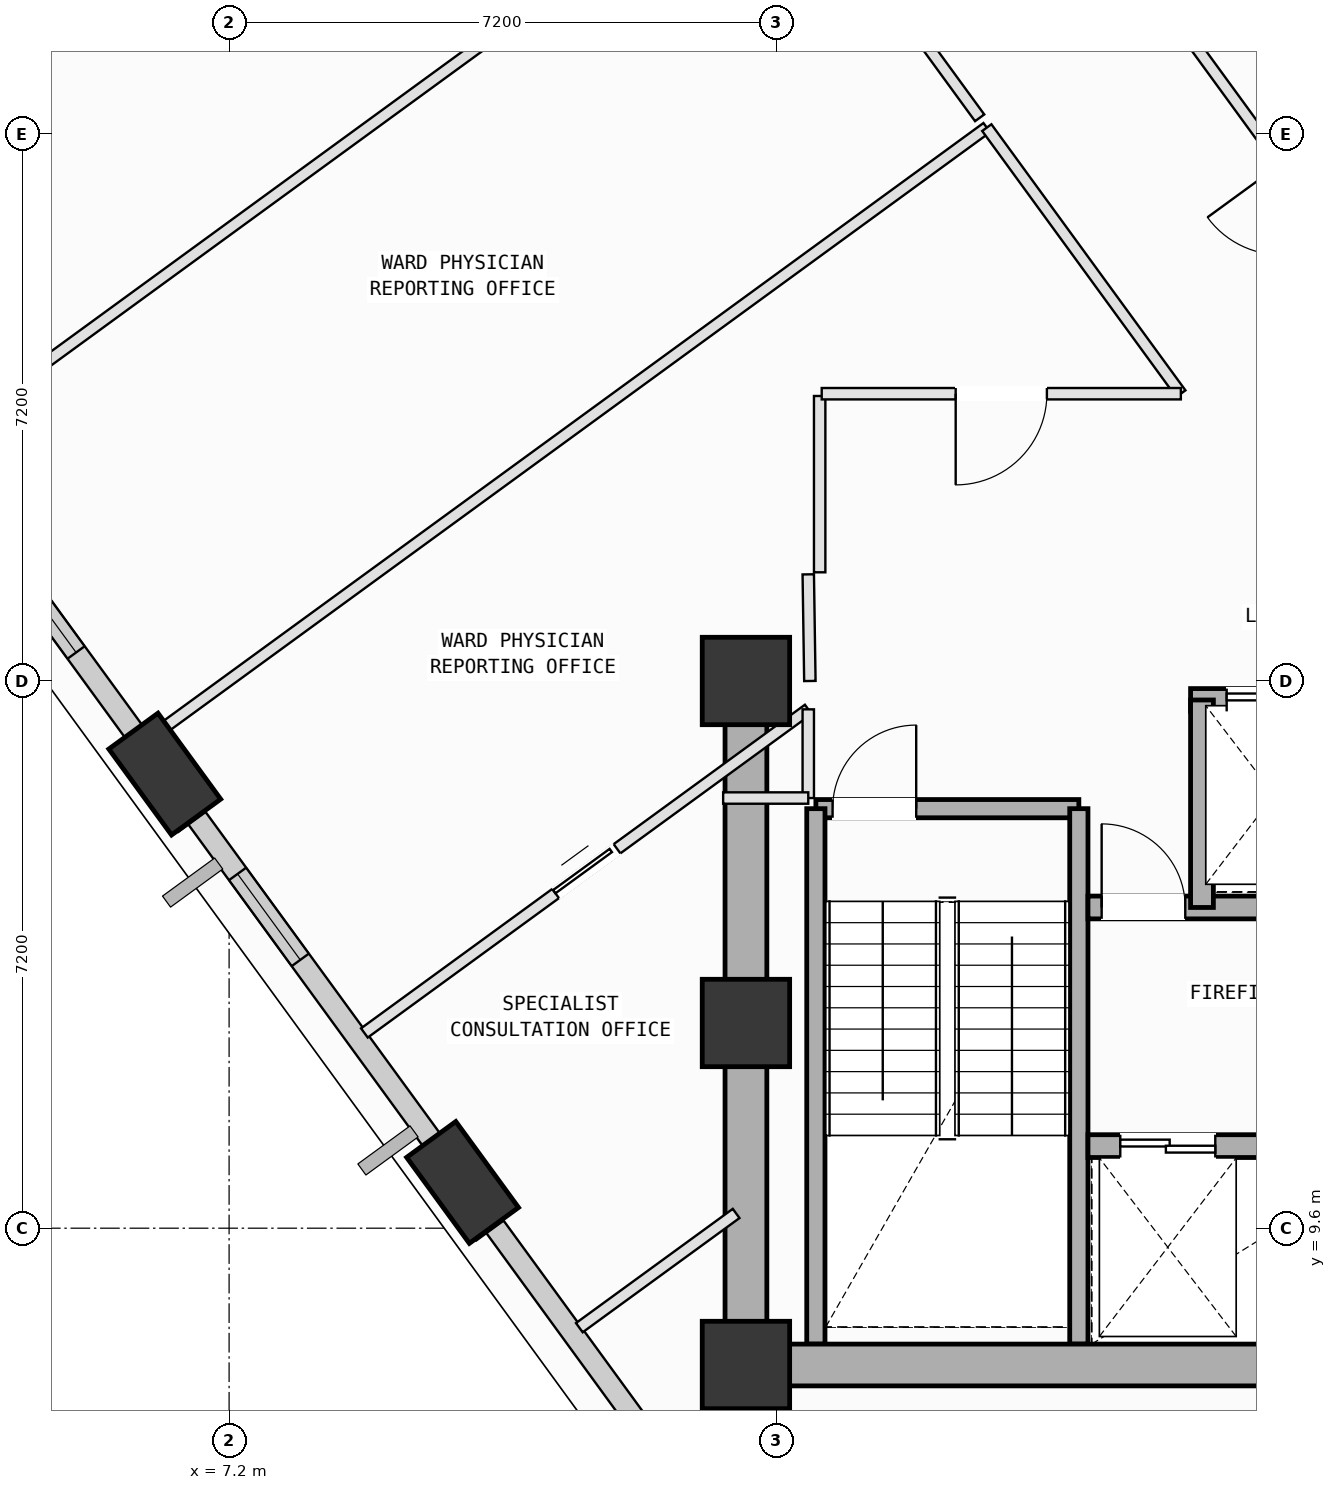
"""IFC4 building model, lengths in metres.
Left out: names, types, materials, properties, quantities, classifications, styles, units other than length and angle.
Written with IfcOpenShell. Run it as: python <this file> out.ifc"""

import sys

from ifc_helpers import new_model, si_unit, direction, frame, frame_2d, origin, origin_2d, place, context, subcontext, project, spatial, rectangle, extrude, element, fill, save


model = new_model("IFC4")
c1 = context("Model", 3, precision=1e-05, world=origin(), true_north=direction((0.0, 1.0)))
c2 = subcontext(c1, "Body", "Model", "MODEL_VIEW")
j1 = project(units=[si_unit("LENGTHUNIT", "METRE"), si_unit("PLANEANGLEUNIT", "RADIAN")], contexts=[c1])
p1 = place(None, origin())
s1 = spatial("IfcSite", under=j1, at=p1, CompositionType="ELEMENT")
p2 = place(p1, origin())
s2 = spatial("IfcBuilding", under=s1, at=p2, CompositionType="ELEMENT")
p3 = place(p2, frame((0.0, 0.0, 177.8)))
s3 = spatial("IfcBuildingStorey", under=s2, at=p3, CompositionType="ELEMENT", Elevation=177.8)
for number, where, z_axis, x_axis in (
    (1, (14.0, 7.8, 0.0), (0.0, 0.0, 1.0), (1.0, 0.0, 0.0)),
    (2, (14.0, 12.3, 0.0), (0.0, 0.0, 1.0), (1.0, 0.0, 0.0)),
    (3, (14.0, 16.8, 0.0), (0.0, 0.0, 1.0), (1.0, 0.0, 0.0)),
):
    element("IfcColumn", number, at=place(p3, frame(where, z_axis=z_axis, x_axis=x_axis)), inside=s3, PredefinedType="COLUMN", context=c2, shape_type="SweptSolid", body=[
        extrude(rectangle(XDim=1.15, YDim=1.15, at=origin_2d()), origin(), (0.0, 0.0, 1.0), 4.0),
    ])
p4 = place(p3, frame((6.354, 15.575, 0.002), z_axis=(0.03888408662, -0.111799331733, 0.992969756454), x_axis=(-0.820057422321, 0.564232872721, 0.095640417382)))
e4 = element("IfcColumn", 4, at=p4, inside=s3, PredefinedType="COLUMN", context=c2, shape_type="SweptSolid", body=[
    extrude(rectangle(XDim=1.4, YDim=0.8, at=origin_2d()), origin(), (0.0, 0.0, 1.0), 4.025),
])
p5 = place(p3, frame((10.272, 10.202, 0.002), z_axis=(0.060879894745, -0.09553833931, 0.993562310144), x_axis=(-0.928301952579, 0.360384350297, 0.091534719641)))
e5 = element("IfcColumn", 5, at=p5, inside=s3, PredefinedType="COLUMN", context=c2, shape_type="SweptSolid", body=[
    extrude(rectangle(XDim=1.4, YDim=0.8, at=origin_2d()), origin(), (0.0, 0.0, 1.0), 4.022),
])
p6 = place(p3, frame((6.198, 15.788, 0.0), z_axis=(0.0, 0.0, 1.0), x_axis=(-0.589159176224, 0.808016995534, 0.0)))
e6 = element("IfcWall", 6, at=p6, inside=s3, PredefinedType="SOLIDWALL", context=c2, shape_type="SweptSolid", body=[
    extrude(rectangle(XDim=5.628, YDim=0.28, at=frame_2d((2.814, 0.0))), origin(), (0.0, 0.0, 1.0), 3.265),
])
p7 = place(p6, frame((1.717, 0.0, 0.75)))
e7 = element("IfcOpeningElement", 7, at=p7, cuts=e6, PredefinedType="OPENING", context=c2, shape_type="SweptSolid", body=[
    extrude(rectangle(XDim=2.0, YDim=1.95, at=frame_2d((1.0, 0.975))), frame((0.0, 0.15, 0.0), z_axis=(0.0, -1.0, 0.0), x_axis=(1.0, 0.0, 0.0)), (0.0, 0.0, 1.0), 0.3),
])
p8 = place(p3, frame((10.114, 10.419, 0.0), z_axis=(0.0, 0.0, 1.0), x_axis=(-0.589176262837, 0.808004536688, 0.0)))
e8 = element("IfcWall", 8, at=p8, inside=s3, PredefinedType="SOLIDWALL", context=c2, shape_type="SweptSolid", body=[
    extrude(rectangle(XDim=5.662, YDim=0.28, at=frame_2d((2.831, 0.0))), origin(), (0.0, 0.0, 1.0), 3.265),
])
p9 = place(p8, frame((3.356, 0.0, 0.75)))
e9 = element("IfcOpeningElement", 9, at=p9, cuts=e8, PredefinedType="OPENING", context=c2, shape_type="SweptSolid", body=[
    extrude(rectangle(XDim=1.4, YDim=1.85, at=frame_2d((0.7, 0.925))), frame((0.0, 0.15, 0.0), z_axis=(0.0, -1.0, 0.0), x_axis=(1.0, 0.0, 0.0)), (0.0, 0.0, 1.0), 0.3),
])
p10 = place(p3, frame((15.035, 3.67, 0.0), z_axis=(0.0, 0.0, 1.0), x_axis=(-0.589198775846, 0.807988120297, 0.0)))
e10 = element("IfcWall", 10, at=p10, inside=s3, PredefinedType="SOLIDWALL", context=c2, shape_type="SweptSolid", body=[
    extrude(rectangle(XDim=7.36, YDim=0.28, at=frame_2d((3.68, 0.0))), origin(), (0.0, 0.0, 1.0), 3.065),
])
p11 = place(p10, frame((2.414, 0.0, 0.75)))
e11 = element("IfcOpeningElement", 11, at=p11, cuts=e10, PredefinedType="OPENING", context=c2, shape_type="SweptSolid", body=[
    extrude(rectangle(XDim=1.8, YDim=2.05, at=frame_2d((0.9, 1.025))), frame((0.0, 0.15, 0.0), z_axis=(0.0, -1.0, 0.0), x_axis=(1.0, 0.0, 0.0)), (0.0, 0.0, 1.0), 0.3),
])
p12 = place(p3, frame((14.92, 15.12, 0.0), z_axis=(0.0, 0.0, 1.0), x_axis=(1.0, 0.0, 0.0)))
e12 = element("IfcWall", 12, at=p12, inside=s3, PredefinedType="SOLIDWALL", context=c2, shape_type="SweptSolid", body=[
    extrude(rectangle(XDim=3.46, YDim=0.24, at=frame_2d((1.73, 0.0))), origin(), (0.0, 0.0, 1.0), 3.78),
])
p13 = place(p12, frame((0.22, 0.0, 0.0)))
e13 = element("IfcOpeningElement", 13, at=p13, cuts=e12, PredefinedType="OPENING", context=c2, shape_type="SweptSolid", body=[
    extrude(rectangle(XDim=1.1, YDim=2.15, at=frame_2d((0.55, 1.075))), frame((0.0, 0.13, 0.0), z_axis=(0.0, -1.0, 0.0), x_axis=(1.0, 0.0, 0.0)), (0.0, 0.0, 1.0), 0.26),
])
for number, where, z_axis, x_axis in (
    (14, (18.38, 15.12, 0.0), (0.0, 0.0, 1.0), (0.0, -1.0, 0.0)),
    (15, (14.92, 8.075, 0.0), (0.0, 0.0, 1.0), (0.0, 1.0, 0.0)),
):
    element("IfcWall", number, at=place(p3, frame(where, z_axis=z_axis, x_axis=x_axis)), inside=s3, PredefinedType="SOLIDWALL", context=c2, shape_type="SweptSolid", body=[
        extrude(rectangle(XDim=7.045, YDim=0.24, at=frame_2d((3.522, 0.0))), origin(), (0.0, 0.0, 1.0), 3.78),
    ])
p14 = place(p3, frame((14.0, 7.8, 0.0), z_axis=(0.0, 0.0, 1.0), x_axis=(1.0, 0.0, 0.0)))
e16 = element("IfcWall", 16, at=p14, inside=s3, PredefinedType="SHEAR", context=c2, shape_type="SweptSolid", body=[
    extrude(rectangle(XDim=10.8, YDim=0.55, at=frame_2d((5.4, 0.0))), origin(), (0.0, 0.0, 1.0), 3.78),
])
p15 = place(p3, frame((14.0, 16.8, 0.0), z_axis=(0.0, 0.0, 1.0), x_axis=(0.0, -1.0, 0.0)))
e17 = element("IfcWall", 17, at=p15, inside=s3, PredefinedType="SHEAR", context=c2, shape_type="SweptSolid", body=[
    extrude(rectangle(XDim=9.0, YDim=0.55, at=frame_2d((4.5, 0.0))), origin(), (0.0, 0.0, 1.0), 3.78),
])
p16 = place(p3, frame((19.85, 16.55, 0.0), z_axis=(0.0, 0.0, 1.0), x_axis=(1.0, 0.0, 0.0)))
e18 = element("IfcWall", 18, at=p16, inside=s3, PredefinedType="SOLIDWALL", context=c2, shape_type="SweptSolid", body=[
    extrude(rectangle(XDim=4.375, YDim=0.3, at=frame_2d((2.188, 0.0))), origin(), (0.0, 0.0, 1.0), 3.78),
])
p17 = place(p16, frame((0.475, 0.0, 0.0)))
e19 = element("IfcOpeningElement", 19, at=p17, cuts=e18, PredefinedType="OPENING", context=c2, shape_type="SweptSolid", body=[
    extrude(rectangle(XDim=1.25, YDim=2.18, at=frame_2d((0.625, 1.09))), frame((0.0, 0.16, 0.0), z_axis=(0.0, -1.0, 0.0), x_axis=(1.0, 0.0, 0.0)), (0.0, 0.0, 1.0), 0.32),
])
p18 = place(p16, frame((2.49, 0.0, 0.0)))
e20 = element("IfcOpeningElement", 20, at=p18, cuts=e18, PredefinedType="OPENING", context=c2, shape_type="SweptSolid", body=[
    extrude(rectangle(XDim=1.02, YDim=2.12, at=frame_2d((0.51, 1.06))), frame((0.0, 0.16, 0.0), z_axis=(0.0, -1.0, 0.0), x_axis=(1.0, 0.0, 0.0)), (0.0, 0.0, 1.0), 0.32),
])
p19 = place(p3, frame((18.5, 10.68, 0.0), z_axis=(0.0, 0.0, 1.0), x_axis=(1.0, 0.0, 0.0)))
e21 = element("IfcWall", 21, at=p19, inside=s3, PredefinedType="SOLIDWALL", context=c2, shape_type="SweptSolid", body=[
    extrude(rectangle(XDim=5.3, YDim=0.3, at=frame_2d((2.65, 0.0))), origin(), (0.0, 0.0, 1.0), 3.78),
])
p20 = place(p19, frame((4.22, 0.0, 0.0)))
e22 = element("IfcOpeningElement", 22, at=p20, cuts=e21, PredefinedType="OPENING", context=c2, shape_type="SweptSolid", body=[
    extrude(rectangle(XDim=0.86, YDim=2.06, at=frame_2d((0.43, 1.03))), frame((0.0, 0.16, 0.0), z_axis=(0.0, -1.0, 0.0), x_axis=(1.0, 0.0, 0.0)), (0.0, 0.0, 1.0), 0.32),
])
p21 = place(p19, frame((0.425, 0.0, 0.0)))
e23 = element("IfcOpeningElement", 23, at=p21, cuts=e21, PredefinedType="OPENING", context=c2, shape_type="SweptSolid", body=[
    extrude(rectangle(XDim=1.25, YDim=2.18, at=frame_2d((0.625, 1.09))), frame((0.0, 0.16, 0.0), z_axis=(0.0, -1.0, 0.0), x_axis=(1.0, 0.0, 0.0)), (0.0, 0.0, 1.0), 0.32),
])
p22 = place(p19, frame((2.525, 0.0, 0.0)))
e24 = element("IfcOpeningElement", 24, at=p22, cuts=e21, PredefinedType="OPENING", context=c2, shape_type="SweptSolid", body=[
    extrude(rectangle(XDim=1.25, YDim=2.18, at=frame_2d((0.625, 1.09))), frame((0.0, 0.16, 0.0), z_axis=(0.0, -1.0, 0.0), x_axis=(1.0, 0.0, 0.0)), (0.0, 0.0, 1.0), 0.32),
])
p23 = place(p3, frame((18.5, 13.82, 0.0), z_axis=(0.0, 0.0, 1.0), x_axis=(1.0, 0.0, 0.0)))
e25 = element("IfcWall", 25, at=p23, inside=s3, PredefinedType="SOLIDWALL", context=c2, shape_type="SweptSolid", body=[
    extrude(rectangle(XDim=5.3, YDim=0.3, at=frame_2d((2.65, 0.0))), origin(), (0.0, 0.0, 1.0), 3.78),
])
p24 = place(p23, frame((0.18, 0.0, 0.0)))
e26 = element("IfcOpeningElement", 26, at=p24, cuts=e25, PredefinedType="OPENING", context=c2, shape_type="SweptSolid", body=[
    extrude(rectangle(XDim=1.1, YDim=2.15, at=frame_2d((0.55, 1.075))), frame((0.0, 0.16, 0.0), z_axis=(0.0, -1.0, 0.0), x_axis=(1.0, 0.0, 0.0)), (0.0, 0.0, 1.0), 0.32),
])
p25 = place(p3, frame((20.0, 13.82, 0.0), z_axis=(0.0, 0.0, 1.0), x_axis=(0.0, 1.0, 0.0)))
e27 = element("IfcWall", 27, at=p25, inside=s3, PredefinedType="SOLIDWALL", context=c2, shape_type="SweptSolid", body=[
    extrude(rectangle(XDim=2.73, YDim=0.3, at=frame_2d((1.365, 0.0))), origin(), (0.0, 0.0, 1.0), 3.78),
])
p26 = place(p3, frame((11.808, 8.291, 0.0), z_axis=(0.0, 0.0, 1.0), x_axis=(0.808256006109, 0.58883123948, 0.0)))
e28 = element("IfcWall", 28, at=p26, inside=s3, PredefinedType="PARTITIONING", context=c2, shape_type="SweptSolid", body=[
    extrude(rectangle(XDim=2.552, YDim=0.15, at=frame_2d((1.276, 0.0))), origin(), (0.0, 0.0, 1.0), 3.78),
])
p27 = place(p3, frame((10.512, 9.482, 0.0), z_axis=(0.0, 0.0, 1.0), x_axis=(-0.589751191607, 0.807584999859, 0.0)))
e29 = element("IfcWall", 29, at=p27, inside=s3, PredefinedType="PARTITIONING", context=c2, shape_type="SweptSolid", body=[
    extrude(rectangle(XDim=0.992, YDim=0.15, at=frame_2d((0.496, 0.0))), origin(), (0.0, 0.0, 1.0), 3.265),
])
p28 = place(p3, frame((8.98, 12.169, 0.0), z_axis=(0.0, 0.0, 1.0), x_axis=(0.808029975649, 0.58914137391, 0.0)))
e30 = element("IfcWall", 30, at=p28, inside=s3, PredefinedType="PARTITIONING", context=c2, shape_type="SweptSolid", body=[
    extrude(rectangle(XDim=7.228, YDim=0.15, at=frame_2d((3.614, 0.0))), origin(), (0.0, 0.0, 1.0), 3.78),
])
p29 = place(p28, frame((3.114, 0.0, 0.0)))
e31 = element("IfcOpeningElement", 31, at=p29, cuts=e30, PredefinedType="OPENING", context=c2, shape_type="SweptSolid", body=[
    extrude(rectangle(XDim=1.0, YDim=2.12, at=frame_2d((0.5, 1.06))), frame((0.0, 0.085, 0.0), z_axis=(0.0, -1.0, 0.0), x_axis=(1.0, 0.0, 0.0)), (0.0, 0.0, 1.0), 0.17),
])
p30 = place(p3, frame((14.82, 16.427, 0.0), z_axis=(0.0, 0.0, 1.0), x_axis=(0.0, -1.0, 0.0)))
e32 = element("IfcWall", 32, at=p30, inside=s3, PredefinedType="PARTITIONING", context=c2, shape_type="SweptSolid", body=[
    extrude(rectangle(XDim=1.167, YDim=0.15, at=frame_2d((0.583, 0.0))), origin(), (0.0, 0.0, 1.0), 3.78),
])
p31 = place(p3, frame((14.82, 15.26, 0.0), z_axis=(0.0, 0.0, 1.0), x_axis=(-1.0, 0.0, 0.0)))
e33 = element("IfcWall", 33, at=p31, inside=s3, PredefinedType="PARTITIONING", context=c2, shape_type="SweptSolid", body=[
    extrude(rectangle(XDim=1.12, YDim=0.15, at=frame_2d((0.56, 0.0))), origin(), (0.0, 0.0, 1.0), 3.78),
])
p32 = place(p3, frame((14.97, 20.55, 0.0), z_axis=(0.0, 0.0, 1.0), x_axis=(0.0, -1.0, 0.0)))
e34 = element("IfcWall", 34, at=p32, inside=s3, PredefinedType="PARTITIONING", context=c2, shape_type="SweptSolid", body=[
    extrude(rectangle(XDim=2.32, YDim=0.15, at=frame_2d((1.16, 0.0))), origin(), (0.0, 0.0, 1.0), 3.78),
])
p33 = place(p3, frame((14.82, 18.203, 0.0), z_axis=(0.0, 0.0, 1.0), x_axis=(0.014965257436, -0.999888014265, 0.0)))
e35 = element("IfcWall", 35, at=p33, inside=s3, PredefinedType="PARTITIONING", context=c2, shape_type="SweptSolid", body=[
    extrude(rectangle(XDim=1.403, YDim=0.15, at=frame_2d((0.702, 0.0))), origin(), (0.0, 0.0, 1.0), 3.78),
])
p34 = place(p3, frame((6.592, 14.858, 0.0), z_axis=(0.0, 0.0, 1.0), x_axis=(-0.589175535911, 0.808005066744, 0.0)))
e36 = element("IfcWall", 36, at=p34, inside=s3, PredefinedType="PARTITIONING", context=c2, shape_type="SweptSolid", body=[
    extrude(rectangle(XDim=0.983, YDim=0.15, at=frame_2d((0.491, 0.0))), origin(), (0.0, 0.0, 1.0), 3.265),
])
p35 = place(p3, frame((6.152, 16.047, 0.0), z_axis=(0.0, 0.0, 1.0), x_axis=(0.807978938545, 0.589211366886, 0.0)))
e37 = element("IfcWall", 37, at=p35, inside=s3, PredefinedType="PARTITIONING", context=c2, shape_type="SweptSolid", body=[
    extrude(rectangle(XDim=13.635, YDim=0.15, at=frame_2d((6.817, 0.0))), origin(), (0.0, 0.0, 1.0), 3.78),
])
p36 = place(p3, frame((17.169, 24.081, 0.0), z_axis=(0.0, 0.0, 1.0), x_axis=(0.589199746841, -0.807987412231, 0.0)))
e38 = element("IfcWall", 38, at=p36, inside=s3, PredefinedType="PARTITIONING", context=c2, shape_type="SweptSolid", body=[
    extrude(rectangle(XDim=4.333, YDim=0.15, at=frame_2d((2.167, 0.0))), origin(), (0.0, 0.0, 1.0), 3.78),
])
p37 = place(p3, frame((19.722, 20.58, 0.0), z_axis=(0.0, 0.0, 1.0), x_axis=(-1.0, 0.0, 0.0)))
e39 = element("IfcWall", 39, at=p37, inside=s3, PredefinedType="PARTITIONING", context=c2, shape_type="SweptSolid", body=[
    extrude(rectangle(XDim=4.725, YDim=0.15, at=frame_2d((2.362, 0.0))), origin(), (0.0, 0.0, 1.0), 3.78),
])
p38 = place(p37, frame((1.762, 0.0, 0.0)))
e40 = element("IfcOpeningElement", 40, at=p38, cuts=e39, PredefinedType="OPENING", context=c2, shape_type="SweptSolid", body=[
    extrude(rectangle(XDim=1.2, YDim=2.15, at=frame_2d((0.6, 1.075))), frame((0.0, 0.085, 0.0), z_axis=(0.0, -1.0, 0.0), x_axis=(1.0, 0.0, 0.0)), (0.0, 0.0, 1.0), 0.17),
])
p39 = place(p3, frame((3.324, 19.925, 0.0), z_axis=(0.0, 0.0, 1.0), x_axis=(0.807985154612, 0.589202842769, 0.0)))
e41 = element("IfcWall", 41, at=p39, inside=s3, PredefinedType="PARTITIONING", context=c2, shape_type="SweptSolid", body=[
    extrude(rectangle(XDim=13.635, YDim=0.15, at=frame_2d((6.818, 0.0))), origin(), (0.0, 0.0, 1.0), 3.78),
])
p40 = place(p3, frame((14.341, 27.959, 0.0), z_axis=(0.0, 0.0, 1.0), x_axis=(0.589203646607, -0.807984568432, 0.0)))
e42 = element("IfcWall", 42, at=p40, inside=s3, PredefinedType="PARTITIONING", context=c2, shape_type="SweptSolid", body=[
    extrude(rectangle(XDim=4.64, YDim=0.15, at=frame_2d((2.32, 0.0))), origin(), (0.0, 0.0, 1.0), 3.78),
])
p41 = place(p40, frame((1.72, 0.0, 0.0)))
e43 = element("IfcOpeningElement", 43, at=p41, cuts=e42, PredefinedType="OPENING", context=c2, shape_type="SweptSolid", body=[
    extrude(rectangle(XDim=1.2, YDim=2.15, at=frame_2d((0.6, 1.075))), frame((0.0, 0.085, 0.0), z_axis=(0.0, -1.0, 0.0), x_axis=(1.0, 0.0, 0.0)), (0.0, 0.0, 1.0), 0.17),
])
p42 = place(p3, frame((23.249, 20.58, 0.0), z_axis=(0.0, 0.0, 1.0), x_axis=(-0.589195373933, 0.807990601019, 0.0)))
e44 = element("IfcWall", 44, at=p42, inside=s3, PredefinedType="PARTITIONING", context=c2, shape_type="SweptSolid", body=[
    extrude(rectangle(XDim=6.293, YDim=0.15, at=frame_2d((3.147, 0.0))), origin(), (0.0, 0.0, 1.0), 3.78),
])
p43 = place(p42, frame((2.547, 0.0, 0.0)))
e45 = element("IfcOpeningElement", 45, at=p43, cuts=e44, PredefinedType="OPENING", context=c2, shape_type="SweptSolid", body=[
    extrude(rectangle(XDim=1.2, YDim=2.15, at=frame_2d((0.6, 1.075))), frame((0.0, 0.085, 0.0), z_axis=(0.0, -1.0, 0.0), x_axis=(1.0, 0.0, 0.0)), (0.0, 0.0, 1.0), 0.17),
])
p44 = place(p7, origin())
e46 = element("IfcWindow", 46, at=p44, inside=s3, PartitioningType="SINGLE_PANEL", PredefinedType="WINDOW", context=c2, shape_type="SweptSolid", body=[
    extrude(rectangle(XDim=2.0, YDim=1.95, at=frame_2d((1.0, 0.975))), frame((0.0, 0.03, 0.0), z_axis=(0.0, -1.0, 0.0), x_axis=(1.0, 0.0, 0.0)), (0.0, 0.0, 1.0), 0.06),
])
fill(e7, e46)
p45 = place(p9, origin())
e47 = element("IfcWindow", 47, at=p45, inside=s3, PartitioningType="SINGLE_PANEL", PredefinedType="WINDOW", context=c2, shape_type="SweptSolid", body=[
    extrude(rectangle(XDim=1.4, YDim=1.85, at=frame_2d((0.7, 0.925))), frame((0.0, 0.03, 0.0), z_axis=(0.0, -1.0, 0.0), x_axis=(1.0, 0.0, 0.0)), (0.0, 0.0, 1.0), 0.06),
])
fill(e9, e47)
p46 = place(p13, origin())
e48 = element("IfcDoor", 48, at=p46, inside=s3, OperationType="SINGLE_SWING_RIGHT", PredefinedType="DOOR", context=c2, shape_type="SweptSolid", body=[
    extrude(rectangle(XDim=1.1, YDim=2.15, at=frame_2d((0.55, 1.075))), frame((0.0, 0.025, 0.0), z_axis=(0.0, -1.0, 0.0), x_axis=(1.0, 0.0, 0.0)), (0.0, 0.0, 1.0), 0.05),
])
fill(e13, e48)
p47 = place(p24, origin())
e49 = element("IfcDoor", 49, at=p47, inside=s3, OperationType="SINGLE_SWING_LEFT", PredefinedType="DOOR", context=c2, shape_type="SweptSolid", body=[
    extrude(rectangle(XDim=1.1, YDim=2.15, at=frame_2d((0.55, 1.075))), frame((0.0, 0.025, 0.0), z_axis=(0.0, -1.0, 0.0), x_axis=(1.0, 0.0, 0.0)), (0.0, 0.0, 1.0), 0.05),
])
fill(e26, e49)
p48 = place(p21, origin())
e50 = element("IfcDoor", 50, at=p48, inside=s3, OperationType="DOUBLE_DOOR_SLIDING", PredefinedType="DOOR", context=c2, shape_type="SweptSolid", body=[
    extrude(rectangle(XDim=1.25, YDim=2.18, at=frame_2d((0.625, 1.09))), frame((0.0, 0.025, 0.0), z_axis=(0.0, -1.0, 0.0), x_axis=(1.0, 0.0, 0.0)), (0.0, 0.0, 1.0), 0.05),
])
fill(e23, e50)
p49 = place(p17, origin())
e51 = element("IfcDoor", 51, at=p49, inside=s3, OperationType="DOUBLE_DOOR_SLIDING", PredefinedType="DOOR", context=c2, shape_type="SweptSolid", body=[
    extrude(rectangle(XDim=1.25, YDim=2.18, at=frame_2d((0.625, 1.09))), frame((0.0, 0.025, 0.0), z_axis=(0.0, -1.0, 0.0), x_axis=(1.0, 0.0, 0.0)), (0.0, 0.0, 1.0), 0.05),
])
fill(e19, e51)
p50 = place(p38, origin())
e52 = element("IfcDoor", 52, at=p50, inside=s3, OperationType="SINGLE_SWING_RIGHT", PredefinedType="DOOR", context=c2, shape_type="SweptSolid", body=[
    extrude(rectangle(XDim=1.2, YDim=2.15, at=frame_2d((0.6, 1.075))), frame((0.0, 0.025, 0.0), z_axis=(0.0, -1.0, 0.0), x_axis=(1.0, 0.0, 0.0)), (0.0, 0.0, 1.0), 0.05),
])
fill(e40, e52)
p51 = place(p29, origin())
e53 = element("IfcDoor", 53, at=p51, inside=s3, OperationType="SLIDING_TO_LEFT", PredefinedType="DOOR", context=c2, shape_type="SweptSolid", body=[
    extrude(rectangle(XDim=1.0, YDim=2.12, at=frame_2d((0.5, 1.06))), frame((0.0, 0.025, 0.0), z_axis=(0.0, -1.0, 0.0), x_axis=(1.0, 0.0, 0.0)), (0.0, 0.0, 1.0), 0.05),
])
fill(e31, e53)
save(model, sys.argv[1])
